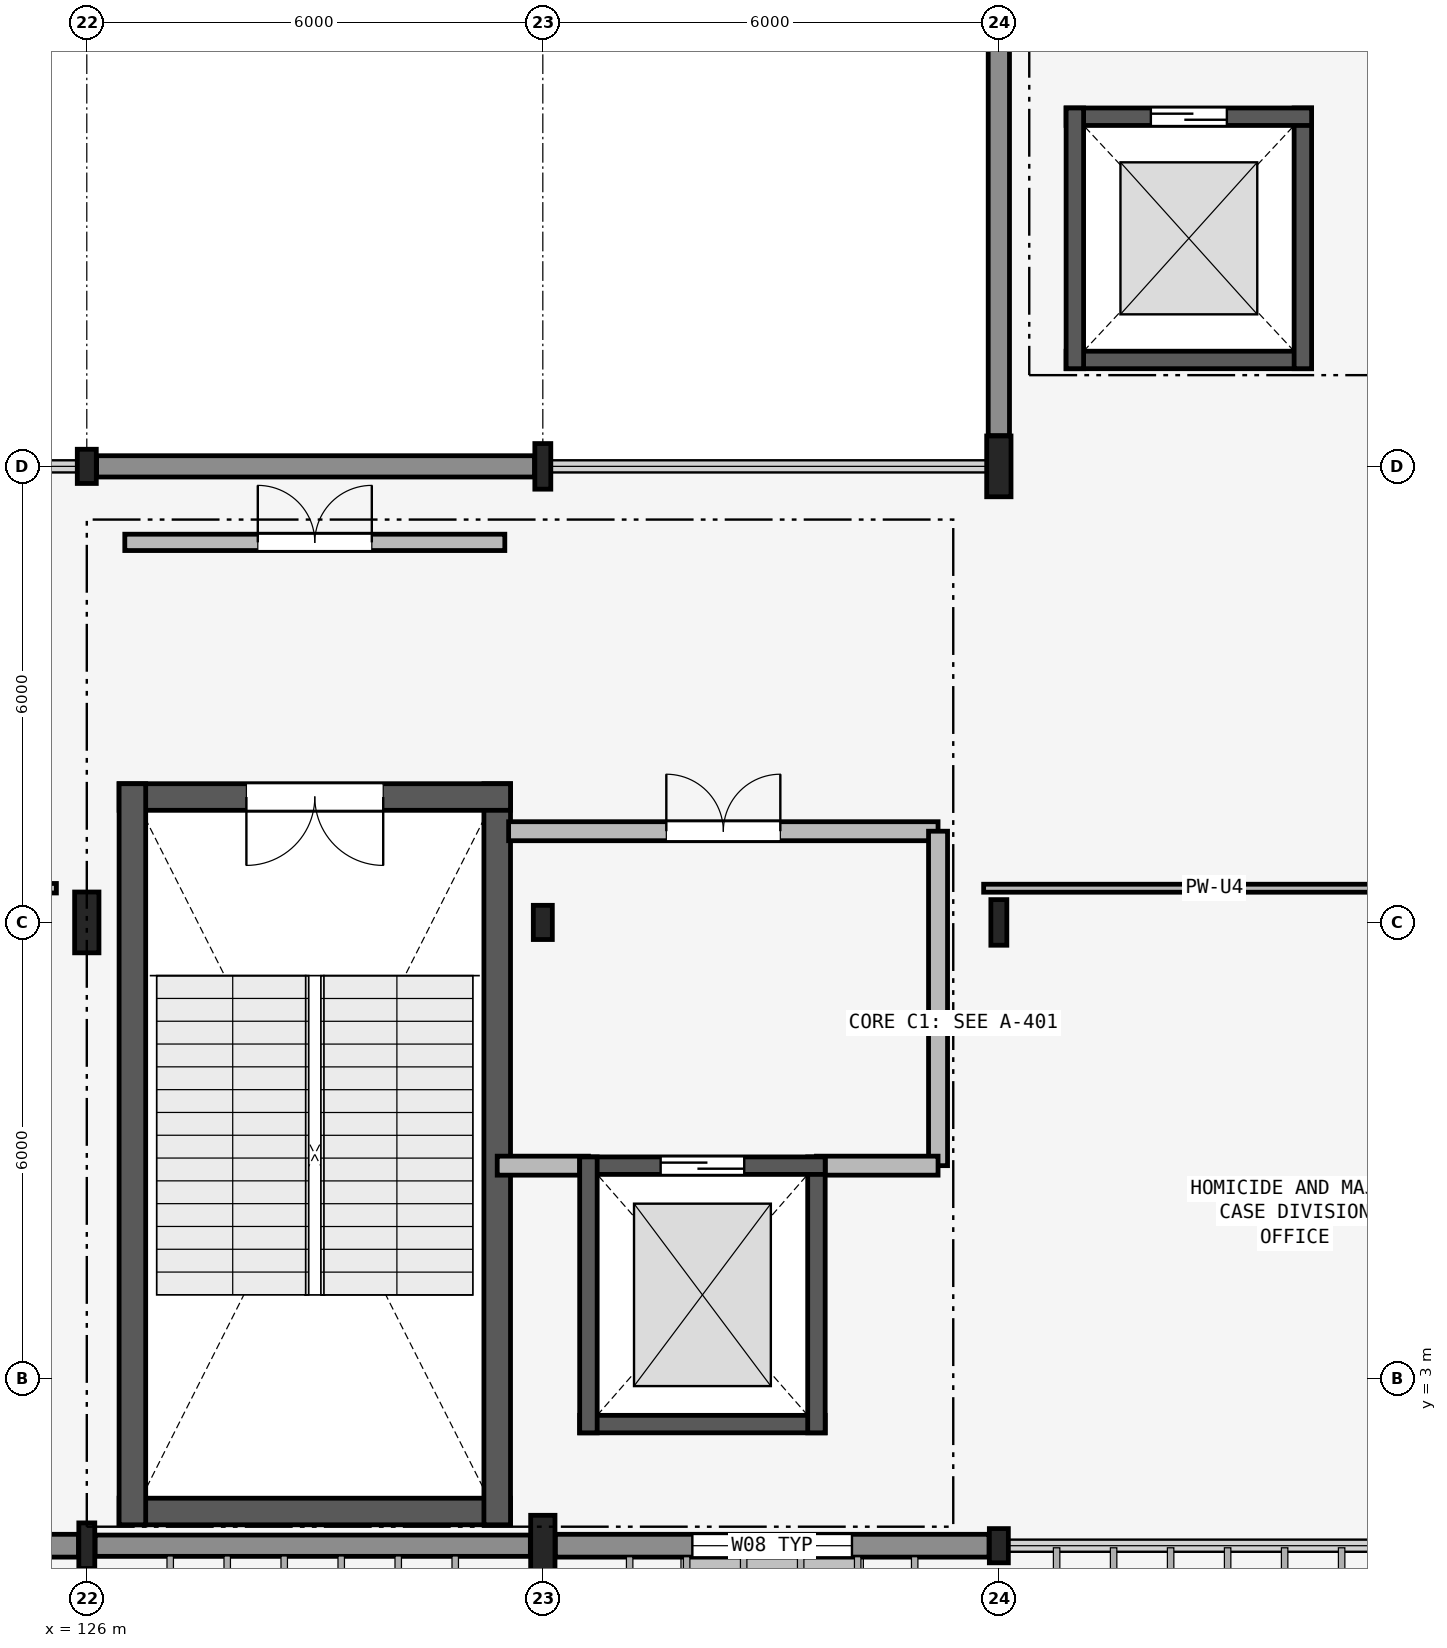
"""IFC4 building model, lengths in metres.
Left out: names, types, materials, properties, quantities, classifications, styles, units other than length and angle.
Written with IfcOpenShell. Run it as: python <this file> out.ifc"""

import sys

from ifc_helpers import new_model, si_unit, direction, frame, frame_2d, origin, origin_2d, place, context, subcontext, project, spatial, rectangle, i_section, extrude, element, fill, save


model = new_model("IFC4")
c1 = context("Model", 3, precision=1e-05, world=origin(), true_north=direction((0.0, 1.0)))
c2 = subcontext(c1, "Body", "Model", "MODEL_VIEW")
j1 = project(units=[si_unit("LENGTHUNIT", "METRE"), si_unit("PLANEANGLEUNIT", "RADIAN")], contexts=[c1])
p1 = place(None, origin())
s1 = spatial("IfcSite", under=j1, at=p1, CompositionType="ELEMENT")
p2 = place(p1, origin())
s2 = spatial("IfcBuilding", under=s1, at=p2, CompositionType="ELEMENT")
p3 = place(p2, frame((0.0, 0.0, 13.5)))
s3 = spatial("IfcBuildingStorey", under=s2, at=p3, CompositionType="ELEMENT", Elevation=13.5)
p4 = place(p3, frame((126.0, 0.8, 0.0), z_axis=(0.0, 0.0, 1.0), x_axis=(1.0, 0.0, 0.0)))
e1 = element("IfcColumn", 1, at=p4, inside=s3, PredefinedType="COLUMN", context=c2, shape_type="SweptSolid", body=[
    extrude(i_section(OverallWidth=0.21, OverallDepth=0.6, WebThickness=0.012, FlangeThickness=0.021, FilletRadius=0.02, at=origin_2d()), origin(), (0.0, 0.0, 1.0), 4.5),
])
p5 = place(p3, frame((126.0, 9.0, 0.0), z_axis=(0.0, 0.0, 1.0), x_axis=(1.0, 0.0, 0.0)))
e2 = element("IfcColumn", 2, at=p5, inside=s3, PredefinedType="COLUMN", context=c2, shape_type="SweptSolid", body=[
    extrude(i_section(OverallWidth=0.32, OverallDepth=0.8, WebThickness=0.016, FlangeThickness=0.028, at=origin_2d()), origin(), (0.0, 0.0, 1.0), 4.5),
])
p6 = place(p3, frame((126.0, 15.0, 0.0), z_axis=(0.0, 0.0, 1.0), x_axis=(1.0, 0.0, 0.0)))
e3 = element("IfcColumn", 3, at=p6, inside=s3, PredefinedType="COLUMN", context=c2, shape_type="SweptSolid", body=[
    extrude(i_section(OverallWidth=0.25, OverallDepth=0.45, WebThickness=0.011, FlangeThickness=0.014, FilletRadius=0.015, at=origin_2d()), origin(), (0.0, 0.0, 1.0), 4.5),
])
p7 = place(p3, frame((132.0, 0.8, 0.0), z_axis=(0.0, 0.0, 1.0), x_axis=(1.0, 0.0, 0.0)))
e4 = element("IfcColumn", 4, at=p7, inside=s3, PredefinedType="COLUMN", context=c2, shape_type="SweptSolid", body=[
    extrude(i_section(OverallWidth=0.32, OverallDepth=0.8, WebThickness=0.016, FlangeThickness=0.028, at=origin_2d()), origin(), (0.0, 0.0, 1.0), 4.5),
])
p8 = place(p3, frame((132.0, 9.0, 0.0), z_axis=(0.0, 0.0, 1.0), x_axis=(1.0, 0.0, 0.0)))
e5 = element("IfcColumn", 5, at=p8, inside=s3, PredefinedType="COLUMN", context=c2, shape_type="SweptSolid", body=[
    extrude(i_section(OverallWidth=0.25, OverallDepth=0.45, WebThickness=0.011, FlangeThickness=0.014, FilletRadius=0.015, at=origin_2d()), origin(), (0.0, 0.0, 1.0), 4.5),
])
p9 = place(p3, frame((132.0, 15.0, 0.0), z_axis=(0.0, 0.0, 1.0), x_axis=(1.0, 0.0, 0.0)))
e6 = element("IfcColumn", 6, at=p9, inside=s3, PredefinedType="COLUMN", context=c2, shape_type="SweptSolid", body=[
    extrude(i_section(OverallWidth=0.21, OverallDepth=0.6, WebThickness=0.012, FlangeThickness=0.021, FilletRadius=0.02, at=origin_2d()), origin(), (0.0, 0.0, 1.0), 4.5),
])
p10 = place(p3, frame((138.0, 0.8, 0.0), z_axis=(0.0, 0.0, 1.0), x_axis=(1.0, 0.0, 0.0)))
e7 = element("IfcColumn", 7, at=p10, inside=s3, PredefinedType="COLUMN", context=c2, shape_type="SweptSolid", body=[
    extrude(i_section(OverallWidth=0.25, OverallDepth=0.45, WebThickness=0.011, FlangeThickness=0.014, FilletRadius=0.015, at=origin_2d()), origin(), (0.0, 0.0, 1.0), 4.5),
])
p11 = place(p3, frame((138.0, 9.0, 0.0), z_axis=(0.0, 0.0, 1.0), x_axis=(1.0, 0.0, 0.0)))
e8 = element("IfcColumn", 8, at=p11, inside=s3, PredefinedType="COLUMN", context=c2, shape_type="SweptSolid", body=[
    extrude(i_section(OverallWidth=0.21, OverallDepth=0.6, WebThickness=0.012, FlangeThickness=0.021, FilletRadius=0.02, at=origin_2d()), origin(), (0.0, 0.0, 1.0), 4.5),
])
p12 = place(p3, frame((138.0, 15.0, 0.0), z_axis=(0.0, 0.0, 1.0), x_axis=(1.0, 0.0, 0.0)))
e9 = element("IfcColumn", 9, at=p12, inside=s3, PredefinedType="COLUMN", context=c2, shape_type="SweptSolid", body=[
    extrude(i_section(OverallWidth=0.32, OverallDepth=0.8, WebThickness=0.016, FlangeThickness=0.028, at=origin_2d()), origin(), (0.0, 0.0, 1.0), 4.5),
])
p13 = place(p3, frame((120.129, 0.8, 0.0), z_axis=(0.0, 0.0, 1.0), x_axis=(1.0, 0.0, 0.0)))
e10 = element("IfcWall", 10, at=p13, inside=s3, PredefinedType="SOLIDWALL", context=c2, shape_type="SweptSolid", body=[
    extrude(rectangle(XDim=5.762, YDim=0.3, at=frame_2d((2.881, 0.0))), origin(), (0.0, 0.0, 1.0), 3.84),
])
p14 = place(p13, frame((1.681, 0.0, 1.1)))
e11 = element("IfcOpeningElement", 11, at=p14, cuts=e10, PredefinedType="OPENING", context=c2, shape_type="SweptSolid", body=[
    extrude(rectangle(XDim=2.4, YDim=1.2, at=frame_2d((1.2, 0.6))), frame((0.0, 0.16, 0.0), z_axis=(0.0, -1.0, 0.0), x_axis=(1.0, 0.0, 0.0)), (0.0, 0.0, 1.0), 0.32),
])
p15 = place(p3, frame((126.109, 0.8, 0.0), z_axis=(0.0, 0.0, 1.0), x_axis=(1.0, 0.0, 0.0)))
e12 = element("IfcWall", 12, at=p15, inside=s3, PredefinedType="SOLIDWALL", context=c2, shape_type="SweptSolid", body=[
    extrude(rectangle(XDim=5.727, YDim=0.28, at=frame_2d((2.864, 0.0))), origin(), (0.0, 0.0, 1.0), 3.84),
])
p16 = place(p3, frame((132.164, 0.8, 0.0), z_axis=(0.0, 0.0, 1.0), x_axis=(1.0, 0.0, 0.0)))
e13 = element("IfcWall", 13, at=p16, inside=s3, PredefinedType="SOLIDWALL", context=c2, shape_type="SweptSolid", body=[
    extrude(rectangle(XDim=5.707, YDim=0.3, at=frame_2d((2.854, 0.0))), origin(), (0.0, 0.0, 1.0), 3.84),
])
p17 = place(p16, frame((1.803, 0.0, 0.9)))
e14 = element("IfcOpeningElement", 14, at=p17, cuts=e13, PredefinedType="OPENING", context=c2, shape_type="SweptSolid", body=[
    extrude(rectangle(XDim=2.1, YDim=1.5, at=frame_2d((1.05, 0.75))), frame((0.0, 0.16, 0.0), z_axis=(0.0, -1.0, 0.0), x_axis=(1.0, 0.0, 0.0)), (0.0, 0.0, 1.0), 0.32),
])
p18 = place(p3, frame((126.129, 15.0, 0.0), z_axis=(0.0, 0.0, 1.0), x_axis=(1.0, 0.0, 0.0)))
e15 = element("IfcWall", 15, at=p18, inside=s3, PredefinedType="SOLIDWALL", context=c2, shape_type="SweptSolid", body=[
    extrude(rectangle(XDim=5.762, YDim=0.28, at=frame_2d((2.881, 0.0))), origin(), (0.0, 0.0, 1.0), 3.59),
])
p19 = place(p3, frame((138.0, 15.404, 0.0), z_axis=(0.0, 0.0, 1.0), x_axis=(0.0, 1.0, 0.0)))
e16 = element("IfcWall", 16, at=p19, inside=s3, PredefinedType="SOLIDWALL", context=c2, shape_type="SweptSolid", body=[
    extrude(rectangle(XDim=5.367, YDim=0.28, at=frame_2d((2.684, 0.0))), origin(), (0.0, 0.0, 1.0), 3.64),
])
p20 = place(p3, frame((126.425, 1.25, 0.0), z_axis=(0.0, 0.0, 1.0), x_axis=(1.0, 0.0, 0.0)))
e17 = element("IfcWall", 17, at=p20, inside=s3, PredefinedType="SHEAR", context=c2, shape_type="SweptSolid", body=[
    extrude(rectangle(XDim=5.15, YDim=0.35, at=frame_2d((2.575, 0.0))), origin(), (0.0, 0.0, 1.0), 4.36),
])
p21 = place(p3, frame((131.4, 1.075, 0.0), z_axis=(0.0, 0.0, 1.0), x_axis=(0.0, 1.0, 0.0)))
e18 = element("IfcWall", 18, at=p21, inside=s3, PredefinedType="SHEAR", context=c2, shape_type="SweptSolid", body=[
    extrude(rectangle(XDim=9.75, YDim=0.35, at=frame_2d((4.875, 0.0))), origin(), (0.0, 0.0, 1.0), 4.36),
])
p22 = place(p3, frame((131.575, 10.65, 0.0), z_axis=(0.0, 0.0, 1.0), x_axis=(-1.0, 0.0, 0.0)))
e19 = element("IfcWall", 19, at=p22, inside=s3, PredefinedType="SHEAR", context=c2, shape_type="SweptSolid", body=[
    extrude(rectangle(XDim=5.15, YDim=0.35, at=frame_2d((2.575, 0.0))), origin(), (0.0, 0.0, 1.0), 4.36),
])
p23 = place(p22, frame((1.675, 0.0, 0.0)))
e20 = element("IfcOpeningElement", 20, at=p23, cuts=e19, PredefinedType="OPENING", context=c2, shape_type="SweptSolid", body=[
    extrude(rectangle(XDim=1.8, YDim=2.2, at=frame_2d((0.9, 1.1))), frame((0.0, 0.185, 0.0), z_axis=(0.0, -1.0, 0.0), x_axis=(1.0, 0.0, 0.0)), (0.0, 0.0, 1.0), 0.37),
])
p24 = place(p3, frame((126.6, 10.825, 0.0), z_axis=(0.0, 0.0, 1.0), x_axis=(0.0, -1.0, 0.0)))
e21 = element("IfcWall", 21, at=p24, inside=s3, PredefinedType="SHEAR", context=c2, shape_type="SweptSolid", body=[
    extrude(rectangle(XDim=9.75, YDim=0.35, at=frame_2d((4.875, 0.0))), origin(), (0.0, 0.0, 1.0), 4.36),
])
p25 = place(p3, frame((126.5, 14.0, 0.0), z_axis=(0.0, 0.0, 1.0), x_axis=(1.0, 0.0, 0.0)))
e22 = element("IfcWall", 22, at=p25, inside=s3, PredefinedType="PARTITIONING", context=c2, shape_type="SweptSolid", body=[
    extrude(rectangle(XDim=5.0, YDim=0.215, at=frame_2d((2.5, 0.0))), origin(), (0.0, 0.0, 1.0), 4.19),
])
p26 = place(p25, frame((1.75, 0.0, 0.0)))
e23 = element("IfcOpeningElement", 23, at=p26, cuts=e22, PredefinedType="OPENING", context=c2, shape_type="SweptSolid", body=[
    extrude(rectangle(XDim=1.5, YDim=2.15, at=frame_2d((0.75, 1.075))), frame((0.0, 0.117, 0.0), z_axis=(0.0, -1.0, 0.0), x_axis=(1.0, 0.0, 0.0)), (0.0, 0.0, 1.0), 0.235),
])
p27 = place(p3, frame((131.55, 10.2, 0.0), z_axis=(0.0, 0.0, 1.0), x_axis=(1.0, 0.0, 0.0)))
e24 = element("IfcWall", 24, at=p27, inside=s3, PredefinedType="PARTITIONING", context=c2, shape_type="SweptSolid", body=[
    extrude(rectangle(XDim=5.65, YDim=0.25, at=frame_2d((2.825, 0.0))), origin(), (0.0, 0.0, 1.0), 3.69),
])
p28 = place(p27, frame((2.075, 0.0, 0.0)))
e25 = element("IfcOpeningElement", 25, at=p28, cuts=e24, PredefinedType="OPENING", context=c2, shape_type="SweptSolid", body=[
    extrude(rectangle(XDim=1.5, YDim=2.15, at=frame_2d((0.75, 1.075))), frame((0.0, 0.135, 0.0), z_axis=(0.0, -1.0, 0.0), x_axis=(1.0, 0.0, 0.0)), (0.0, 0.0, 1.0), 0.27),
])
p29 = place(p3, frame((137.2, 5.8, 0.0), z_axis=(0.0, 0.0, 1.0), x_axis=(0.0, 1.0, 0.0)))
e26 = element("IfcWall", 26, at=p29, inside=s3, PredefinedType="PARTITIONING", context=c2, shape_type="SweptSolid", body=[
    extrude(rectangle(XDim=4.4, YDim=0.25, at=frame_2d((2.2, 0.0))), origin(), (0.0, 0.0, 1.0), 3.59),
])
p30 = place(p3, frame((135.6, 5.8, 0.0), z_axis=(0.0, 0.0, 1.0), x_axis=(1.0, 0.0, 0.0)))
e27 = element("IfcWall", 27, at=p30, inside=s3, PredefinedType="PARTITIONING", context=c2, shape_type="SweptSolid", body=[
    extrude(rectangle(XDim=1.6, YDim=0.25, at=frame_2d((0.8, 0.0))), origin(), (0.0, 0.0, 1.0), 4.19),
])
p31 = place(p3, frame((131.4, 5.8, 0.0), z_axis=(0.0, 0.0, 1.0), x_axis=(1.0, 0.0, 0.0)))
e28 = element("IfcWall", 28, at=p31, inside=s3, PredefinedType="PARTITIONING", context=c2, shape_type="SweptSolid", body=[
    extrude(rectangle(XDim=1.2, YDim=0.25, at=frame_2d((0.6, 0.0))), origin(), (0.0, 0.0, 1.0), 3.866),
])
p32 = place(p3, frame((132.485, 2.4, 0.0), z_axis=(0.0, 0.0, 1.0), x_axis=(1.0, 0.0, 0.0)))
e29 = element("IfcWall", 29, at=p32, inside=s3, PredefinedType="SHEAR", context=c2, shape_type="SweptSolid", body=[
    extrude(rectangle(XDim=3.23, YDim=0.23, at=frame_2d((1.615, 0.0))), origin(), (0.0, 0.0, 1.0), 4.5),
])
p33 = place(p3, frame((135.6, 2.285, 0.0), z_axis=(0.0, 0.0, 1.0), x_axis=(0.0, 1.0, 0.0)))
e30 = element("IfcWall", 30, at=p33, inside=s3, PredefinedType="SHEAR", context=c2, shape_type="SweptSolid", body=[
    extrude(rectangle(XDim=3.63, YDim=0.23, at=frame_2d((1.815, 0.0))), origin(), (0.0, 0.0, 1.0), 4.5),
])
p34 = place(p3, frame((135.715, 5.8, 0.0), z_axis=(0.0, 0.0, 1.0), x_axis=(-1.0, 0.0, 0.0)))
e31 = element("IfcWall", 31, at=p34, inside=s3, PredefinedType="SHEAR", context=c2, shape_type="SweptSolid", body=[
    extrude(rectangle(XDim=3.23, YDim=0.23, at=frame_2d((1.615, 0.0))), origin(), (0.0, 0.0, 1.0), 4.5),
])
p35 = place(p34, frame((1.065, 0.0, 0.0)))
e32 = element("IfcOpeningElement", 32, at=p35, cuts=e31, PredefinedType="OPENING", context=c2, shape_type="SweptSolid", body=[
    extrude(rectangle(XDim=1.1, YDim=2.2, at=frame_2d((0.55, 1.1))), frame((0.0, 0.125, 0.0), z_axis=(0.0, -1.0, 0.0), x_axis=(1.0, 0.0, 0.0)), (0.0, 0.0, 1.0), 0.25),
])
p36 = place(p3, frame((132.6, 5.915, 0.0), z_axis=(0.0, 0.0, 1.0), x_axis=(0.0, -1.0, 0.0)))
e33 = element("IfcWall", 33, at=p36, inside=s3, PredefinedType="SHEAR", context=c2, shape_type="SweptSolid", body=[
    extrude(rectangle(XDim=3.63, YDim=0.23, at=frame_2d((1.815, 0.0))), origin(), (0.0, 0.0, 1.0), 4.5),
])
p37 = place(p3, frame((138.885, 16.4, 0.0), z_axis=(0.0, 0.0, 1.0), x_axis=(1.0, 0.0, 0.0)))
e34 = element("IfcWall", 34, at=p37, inside=s3, PredefinedType="SHEAR", context=c2, shape_type="SweptSolid", body=[
    extrude(rectangle(XDim=3.23, YDim=0.23, at=frame_2d((1.615, 0.0))), origin(), (0.0, 0.0, 1.0), 4.5),
])
p38 = place(p3, frame((142.0, 16.285, 0.0), z_axis=(0.0, 0.0, 1.0), x_axis=(0.0, 1.0, 0.0)))
e35 = element("IfcWall", 35, at=p38, inside=s3, PredefinedType="SHEAR", context=c2, shape_type="SweptSolid", body=[
    extrude(rectangle(XDim=3.43, YDim=0.23, at=frame_2d((1.715, 0.0))), origin(), (0.0, 0.0, 1.0), 4.5),
])
p39 = place(p3, frame((142.115, 19.6, 0.0), z_axis=(0.0, 0.0, 1.0), x_axis=(-1.0, 0.0, 0.0)))
e36 = element("IfcWall", 36, at=p39, inside=s3, PredefinedType="SHEAR", context=c2, shape_type="SweptSolid", body=[
    extrude(rectangle(XDim=3.23, YDim=0.23, at=frame_2d((1.615, 0.0))), origin(), (0.0, 0.0, 1.0), 4.5),
])
p40 = place(p39, frame((1.115, 0.0, 0.0)))
e37 = element("IfcOpeningElement", 37, at=p40, cuts=e36, PredefinedType="OPENING", context=c2, shape_type="SweptSolid", body=[
    extrude(rectangle(XDim=1.0, YDim=2.15, at=frame_2d((0.5, 1.075))), frame((0.0, 0.125, 0.0), z_axis=(0.0, -1.0, 0.0), x_axis=(1.0, 0.0, 0.0)), (0.0, 0.0, 1.0), 0.25),
])
p41 = place(p3, frame((139.0, 19.715, 0.0), z_axis=(0.0, 0.0, 1.0), x_axis=(0.0, -1.0, 0.0)))
e38 = element("IfcWall", 38, at=p41, inside=s3, PredefinedType="SHEAR", context=c2, shape_type="SweptSolid", body=[
    extrude(rectangle(XDim=3.43, YDim=0.23, at=frame_2d((1.715, 0.0))), origin(), (0.0, 0.0, 1.0), 4.5),
])
p42 = place(p3, frame((108.5, 9.45, 0.0), z_axis=(0.0, 0.0, 1.0), x_axis=(1.0, 0.0, 0.0)))
e39 = element("IfcWall", 39, at=p42, inside=s3, PredefinedType="PARTITIONING", context=c2, shape_type="SweptSolid", body=[
    extrude(rectangle(XDim=17.1, YDim=0.125, at=frame_2d((8.55, 0.0))), origin(), (0.0, 0.0, 1.0), 3.69),
])
p43 = place(p42, frame((8.05, 0.0, 0.0)))
e40 = element("IfcOpeningElement", 40, at=p43, cuts=e39, PredefinedType="OPENING", context=c2, shape_type="SweptSolid", body=[
    extrude(rectangle(XDim=1.0, YDim=2.15, at=frame_2d((0.5, 1.075))), frame((0.0, 0.073, 0.0), z_axis=(0.0, -1.0, 0.0), x_axis=(1.0, 0.0, 0.0)), (0.0, 0.0, 1.0), 0.145),
])
p44 = place(p3, frame((137.8, 9.45, 0.0), z_axis=(0.0, 0.0, 1.0), x_axis=(1.0, 0.0, 0.0)))
e41 = element("IfcWall", 41, at=p44, inside=s3, PredefinedType="PARTITIONING", context=c2, shape_type="SweptSolid", body=[
    extrude(rectangle(XDim=13.8, YDim=0.105, at=frame_2d((6.9, 0.0))), origin(), (0.0, 0.0, 1.0), 3.69),
])
p45 = place(p44, frame((6.875, 0.0, 0.0)))
e42 = element("IfcOpeningElement", 42, at=p45, cuts=e41, PredefinedType="OPENING", context=c2, shape_type="SweptSolid", body=[
    extrude(rectangle(XDim=0.95, YDim=2.15, at=frame_2d((0.475, 1.075))), frame((0.0, 0.062, 0.0), z_axis=(0.0, -1.0, 0.0), x_axis=(1.0, 0.0, 0.0)), (0.0, 0.0, 1.0), 0.125),
])
p46 = place(p44, frame((8.475, 0.0, 0.9)))
e43 = element("IfcOpeningElement", 43, at=p46, cuts=e41, PredefinedType="OPENING", context=c2, shape_type="SweptSolid", body=[
    extrude(rectangle(XDim=2.2, YDim=1.4, at=frame_2d((1.1, 0.7))), frame((0.0, 0.062, 0.0), z_axis=(0.0, -1.0, 0.0), x_axis=(1.0, 0.0, 0.0)), (0.0, 0.0, 1.0), 0.125),
])
p47 = place(p17, origin())
e44 = element("IfcWindow", 44, at=p47, inside=s3, PartitioningType="SINGLE_PANEL", PredefinedType="WINDOW", context=c2, shape_type="SweptSolid", body=[
    extrude(rectangle(XDim=2.1, YDim=1.5, at=frame_2d((1.05, 0.75))), frame((0.0, 0.03, 0.0), z_axis=(0.0, -1.0, 0.0), x_axis=(1.0, 0.0, 0.0)), (0.0, 0.0, 1.0), 0.06),
])
fill(e14, e44)
p48 = place(p23, origin())
e45 = element("IfcDoor", 45, at=p48, inside=s3, OperationType="DOUBLE_DOOR_SINGLE_SWING", PredefinedType="DOOR", context=c2, shape_type="SweptSolid", body=[
    extrude(rectangle(XDim=1.8, YDim=2.2, at=frame_2d((0.9, 1.1))), frame((0.0, 0.025, 0.0), z_axis=(0.0, -1.0, 0.0), x_axis=(1.0, 0.0, 0.0)), (0.0, 0.0, 1.0), 0.05),
])
fill(e20, e45)
p49 = place(p26, origin())
e46 = element("IfcDoor", 46, at=p49, inside=s3, OperationType="DOUBLE_DOOR_SINGLE_SWING", PredefinedType="DOOR", context=c2, shape_type="SweptSolid", body=[
    extrude(rectangle(XDim=1.5, YDim=2.15, at=frame_2d((0.75, 1.075))), frame((0.0, 0.025, 0.0), z_axis=(0.0, -1.0, 0.0), x_axis=(1.0, 0.0, 0.0)), (0.0, 0.0, 1.0), 0.05),
])
fill(e23, e46)
p50 = place(p28, origin())
e47 = element("IfcDoor", 47, at=p50, inside=s3, OperationType="DOUBLE_DOOR_SINGLE_SWING", PredefinedType="DOOR", context=c2, shape_type="SweptSolid", body=[
    extrude(rectangle(XDim=1.5, YDim=2.15, at=frame_2d((0.75, 1.075))), frame((0.0, 0.025, 0.0), z_axis=(0.0, -1.0, 0.0), x_axis=(1.0, 0.0, 0.0)), (0.0, 0.0, 1.0), 0.05),
])
fill(e25, e47)
p51 = place(p35, origin())
e48 = element("IfcDoor", 48, at=p51, inside=s3, OperationType="SLIDING_TO_LEFT", PredefinedType="DOOR", context=c2, shape_type="SweptSolid", body=[
    extrude(rectangle(XDim=1.1, YDim=2.2, at=frame_2d((0.55, 1.1))), frame((0.0, 0.025, 0.0), z_axis=(0.0, -1.0, 0.0), x_axis=(1.0, 0.0, 0.0)), (0.0, 0.0, 1.0), 0.05),
])
fill(e32, e48)
p52 = place(p40, origin())
e49 = element("IfcDoor", 49, at=p52, inside=s3, OperationType="SLIDING_TO_LEFT", PredefinedType="DOOR", context=c2, shape_type="SweptSolid", body=[
    extrude(rectangle(XDim=1.0, YDim=2.15, at=frame_2d((0.5, 1.075))), frame((0.0, 0.025, 0.0), z_axis=(0.0, -1.0, 0.0), x_axis=(1.0, 0.0, 0.0)), (0.0, 0.0, 1.0), 0.05),
])
fill(e37, e49)
save(model, sys.argv[1])
